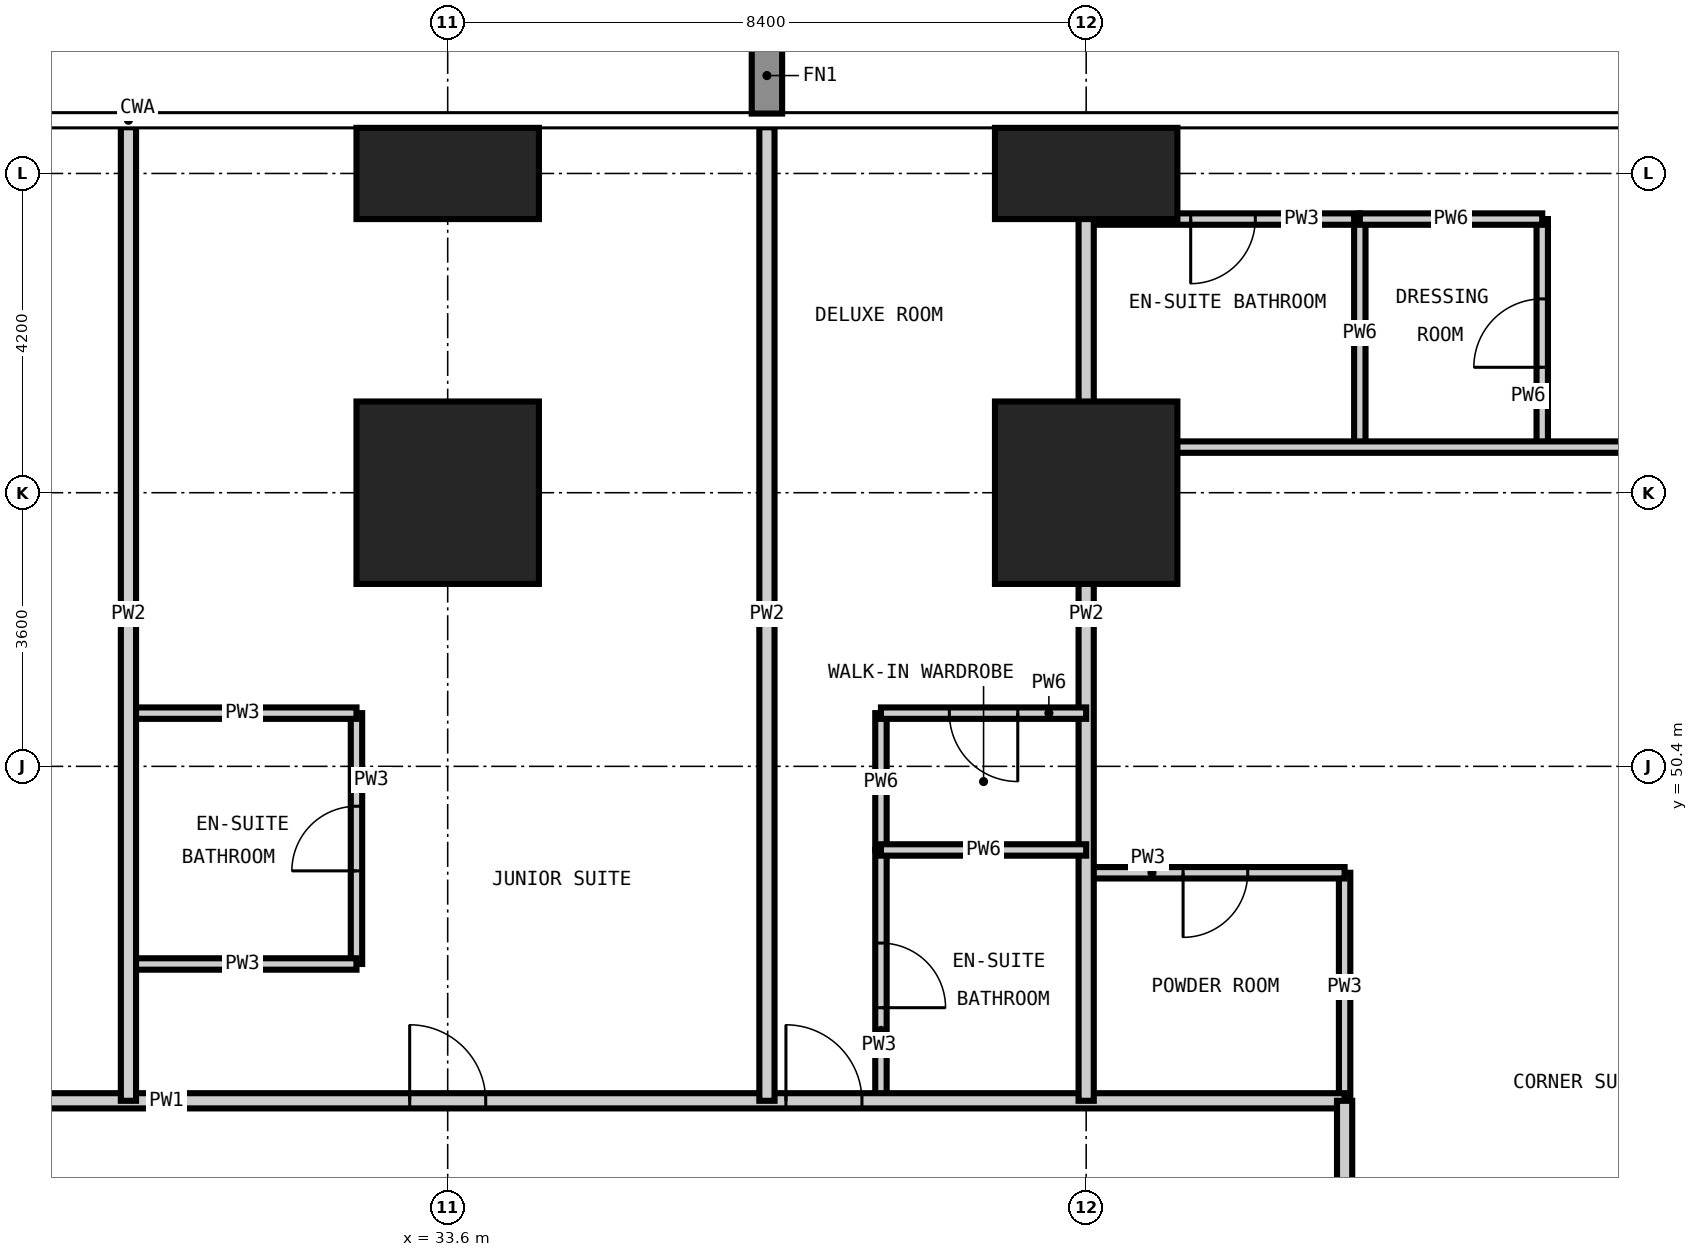
"""IFC4 building model, lengths in metres.
Left out: names, types, materials, properties, quantities, classifications, styles, units other than length and angle.
Written with IfcOpenShell. Run it as: python <this file> out.ifc"""

import sys

from ifc_helpers import new_model, si_unit, direction, frame, frame_2d, origin, origin_2d, place, context, subcontext, project, spatial, rectangle, extrude, element, fill, save


model = new_model("IFC4")
c1 = context("Model", 3, precision=1e-05, world=origin(), true_north=direction((0.0, 1.0)))
c2 = subcontext(c1, "Body", "Model", "MODEL_VIEW")
j1 = project(units=[si_unit("LENGTHUNIT", "METRE"), si_unit("PLANEANGLEUNIT", "RADIAN")], contexts=[c1])
p1 = place(None, origin())
s1 = spatial("IfcSite", under=j1, at=p1, CompositionType="ELEMENT")
p2 = place(p1, origin())
s2 = spatial("IfcBuilding", under=s1, at=p2, CompositionType="ELEMENT")
p3 = place(p2, frame((0.0, 0.0, 81.0)))
s3 = spatial("IfcBuildingStorey", under=s2, at=p3, CompositionType="ELEMENT", Elevation=81.0)
p4 = place(p3, frame((33.6, 54.0, -0.35), z_axis=(0.0, 0.0, 1.0), x_axis=(1.0, 0.0, 0.0)))
e1 = element("IfcColumn", 1, at=p4, inside=s3, PredefinedType="COLUMN", context=c2, shape_type="SweptSolid", body=[
    extrude(rectangle(XDim=2.4, YDim=2.4, at=origin_2d()), origin(), (0.0, 0.0, 1.0), 3.6),
])
p5 = place(p3, frame((33.6, 58.2, -0.35), z_axis=(0.0, 0.0, 1.0), x_axis=(1.0, 0.0, 0.0)))
e2 = element("IfcColumn", 2, at=p5, inside=s3, PredefinedType="COLUMN", context=c2, shape_type="SweptSolid", body=[
    extrude(rectangle(XDim=2.4, YDim=1.2, at=origin_2d()), origin(), (0.0, 0.0, 1.0), 3.6),
])
p6 = place(p3, frame((42.0, 54.0, -0.35), z_axis=(0.0, 0.0, 1.0), x_axis=(1.0, 0.0, 0.0)))
e3 = element("IfcColumn", 3, at=p6, inside=s3, PredefinedType="COLUMN", context=c2, shape_type="SweptSolid", body=[
    extrude(rectangle(XDim=2.4, YDim=2.4, at=origin_2d()), origin(), (0.0, 0.0, 1.0), 3.6),
])
p7 = place(p3, frame((42.0, 58.2, -0.35), z_axis=(0.0, 0.0, 1.0), x_axis=(1.0, 0.0, 0.0)))
e4 = element("IfcColumn", 4, at=p7, inside=s3, PredefinedType="COLUMN", context=c2, shape_type="SweptSolid", body=[
    extrude(rectangle(XDim=2.4, YDim=1.2, at=origin_2d()), origin(), (0.0, 0.0, 1.0), 3.6),
])
p8 = place(p3, frame((32.4, 47.8, 0.0), z_axis=(0.0, 0.0, 1.0), x_axis=(0.0, 1.0, 0.0)))
e5 = element("IfcWall", 5, at=p8, inside=s3, PredefinedType="PARTITIONING", context=c2, shape_type="SweptSolid", body=[
    extrude(rectangle(XDim=3.3, YDim=0.15, at=frame_2d((1.65, 0.0))), origin(), (0.0, 0.0, 1.0), 3.25),
])
p9 = place(p8, frame((1.225, 0.0, 0.0)))
e6 = element("IfcOpeningElement", 6, at=p9, cuts=e5, PredefinedType="OPENING", context=c2, shape_type="SweptSolid", body=[
    extrude(rectangle(XDim=0.85, YDim=2.1, at=frame_2d((0.425, 1.05))), frame((0.0, 0.085, 0.0), z_axis=(0.0, -1.0, 0.0), x_axis=(1.0, 0.0, 0.0)), (0.0, 0.0, 1.0), 0.17),
])
p10 = place(p3, frame((39.3, 46.0, 0.0), z_axis=(0.0, 0.0, 1.0), x_axis=(0.0, 1.0, 0.0)))
e7 = element("IfcWall", 7, at=p10, inside=s3, PredefinedType="PARTITIONING", context=c2, shape_type="SweptSolid", body=[
    extrude(rectangle(XDim=3.3, YDim=0.15, at=frame_2d((1.65, 0.0))), origin(), (0.0, 0.0, 1.0), 3.25),
])
p11 = place(p10, frame((1.225, 0.0, 0.0)))
e8 = element("IfcOpeningElement", 8, at=p11, cuts=e7, PredefinedType="OPENING", context=c2, shape_type="SweptSolid", body=[
    extrude(rectangle(XDim=0.85, YDim=2.1, at=frame_2d((0.425, 1.05))), frame((0.0, 0.085, 0.0), z_axis=(0.0, -1.0, 0.0), x_axis=(1.0, 0.0, 0.0)), (0.0, 0.0, 1.0), 0.17),
])
for number, where, z_axis, x_axis in (
    (9, (45.4, 46.0, 0.0), (0.0, 0.0, 1.0), (0.0, 1.0, 0.0)),
    (10, (29.4, 47.8, 0.0), (0.0, 0.0, 1.0), (1.0, 0.0, 0.0)),
):
    element("IfcWall", number, at=place(p3, frame(where, z_axis=z_axis, x_axis=x_axis)), inside=s3, PredefinedType="PARTITIONING", context=c2, shape_type="SweptSolid", body=[
        extrude(rectangle(XDim=3.0, YDim=0.15, at=frame_2d((1.5, 0.0))), origin(), (0.0, 0.0, 1.0), 3.25),
    ])
p12 = place(p3, frame((42.0, 49.0, 0.0), z_axis=(0.0, 0.0, 1.0), x_axis=(1.0, 0.0, 0.0)))
e11 = element("IfcWall", 11, at=p12, inside=s3, PredefinedType="PARTITIONING", context=c2, shape_type="SweptSolid", body=[
    extrude(rectangle(XDim=3.4, YDim=0.15, at=frame_2d((1.7, 0.0))), origin(), (0.0, 0.0, 1.0), 3.25),
])
p13 = place(p12, frame((1.275, 0.0, 0.0)))
e12 = element("IfcOpeningElement", 12, at=p13, cuts=e11, PredefinedType="OPENING", context=c2, shape_type="SweptSolid", body=[
    extrude(rectangle(XDim=0.85, YDim=2.1, at=frame_2d((0.425, 1.05))), frame((0.0, 0.085, 0.0), z_axis=(0.0, -1.0, 0.0), x_axis=(1.0, 0.0, 0.0)), (0.0, 0.0, 1.0), 0.17),
])
p14 = place(p3, frame((29.4, 51.1, 0.0), z_axis=(0.0, 0.0, 1.0), x_axis=(1.0, 0.0, 0.0)))
e13 = element("IfcWall", 13, at=p14, inside=s3, PredefinedType="PARTITIONING", context=c2, shape_type="SweptSolid", body=[
    extrude(rectangle(XDim=3.0, YDim=0.15, at=frame_2d((1.5, 0.0))), origin(), (0.0, 0.0, 1.0), 3.25),
])
p15 = place(p3, frame((42.0, 57.6, 0.0), z_axis=(0.0, 0.0, 1.0), x_axis=(1.0, 0.0, 0.0)))
e14 = element("IfcWall", 14, at=p15, inside=s3, PredefinedType="PARTITIONING", context=c2, shape_type="SweptSolid", body=[
    extrude(rectangle(XDim=3.6, YDim=0.15, at=frame_2d((1.8, 0.0))), origin(), (0.0, 0.0, 1.0), 3.25),
])
p16 = place(p15, frame((1.375, 0.0, 0.0)))
e15 = element("IfcOpeningElement", 15, at=p16, cuts=e14, PredefinedType="OPENING", context=c2, shape_type="SweptSolid", body=[
    extrude(rectangle(XDim=0.85, YDim=2.1, at=frame_2d((0.425, 1.05))), frame((0.0, 0.085, 0.0), z_axis=(0.0, -1.0, 0.0), x_axis=(1.0, 0.0, 0.0)), (0.0, 0.0, 1.0), 0.17),
])
p17 = place(p3, frame((14.0, 46.0, 0.0), z_axis=(0.0, 0.0, 1.0), x_axis=(1.0, 0.0, 0.0)))
e16 = element("IfcWall", 16, at=p17, inside=s3, PredefinedType="PARTITIONING", context=c2, shape_type="SweptSolid", body=[
    extrude(rectangle(XDim=31.4, YDim=0.2, at=frame_2d((15.7, 0.0))), origin(), (0.0, 0.0, 1.0), 3.25),
])
p18 = place(p17, frame((5.75, 0.0, 0.0)))
e17 = element("IfcOpeningElement", 17, at=p18, cuts=e16, PredefinedType="OPENING", context=c2, shape_type="SweptSolid", body=[
    extrude(rectangle(XDim=1.0, YDim=2.2, at=frame_2d((0.5, 1.1))), frame((0.0, 0.11, 0.0), z_axis=(0.0, -1.0, 0.0), x_axis=(1.0, 0.0, 0.0)), (0.0, 0.0, 1.0), 0.22),
])
p19 = place(p17, frame((10.7, 0.0, 0.0)))
e18 = element("IfcOpeningElement", 18, at=p19, cuts=e16, PredefinedType="OPENING", context=c2, shape_type="SweptSolid", body=[
    extrude(rectangle(XDim=1.0, YDim=2.2, at=frame_2d((0.5, 1.1))), frame((0.0, 0.11, 0.0), z_axis=(0.0, -1.0, 0.0), x_axis=(1.0, 0.0, 0.0)), (0.0, 0.0, 1.0), 0.22),
])
p20 = place(p17, frame((19.1, 0.0, 0.0)))
e19 = element("IfcOpeningElement", 19, at=p20, cuts=e16, PredefinedType="OPENING", context=c2, shape_type="SweptSolid", body=[
    extrude(rectangle(XDim=1.0, YDim=2.2, at=frame_2d((0.5, 1.1))), frame((0.0, 0.11, 0.0), z_axis=(0.0, -1.0, 0.0), x_axis=(1.0, 0.0, 0.0)), (0.0, 0.0, 1.0), 0.22),
])
p21 = place(p17, frame((24.05, 0.0, 0.0)))
e20 = element("IfcOpeningElement", 20, at=p21, cuts=e16, PredefinedType="OPENING", context=c2, shape_type="SweptSolid", body=[
    extrude(rectangle(XDim=1.0, YDim=2.2, at=frame_2d((0.5, 1.1))), frame((0.0, 0.11, 0.0), z_axis=(0.0, -1.0, 0.0), x_axis=(1.0, 0.0, 0.0)), (0.0, 0.0, 1.0), 0.22),
])
p22 = place(p3, frame((45.4, 46.0, 0.0), z_axis=(0.0, 0.0, 1.0), x_axis=(0.0, -1.0, 0.0)))
e21 = element("IfcWall", 21, at=p22, inside=s3, PredefinedType="PARTITIONING", context=c2, shape_type="SweptSolid", body=[
    extrude(rectangle(XDim=32.0, YDim=0.2, at=frame_2d((16.0, 0.0))), origin(), (0.0, 0.0, 1.0), 3.25),
])
p23 = place(p22, frame((22.4, 0.0, 0.0)))
e22 = element("IfcOpeningElement", 22, at=p23, cuts=e21, PredefinedType="OPENING", context=c2, shape_type="SweptSolid", body=[
    extrude(rectangle(XDim=1.0, YDim=2.2, at=frame_2d((0.5, 1.1))), frame((0.0, 0.11, 0.0), z_axis=(0.0, -1.0, 0.0), x_axis=(1.0, 0.0, 0.0)), (0.0, 0.0, 1.0), 0.22),
])
p24 = place(p22, frame((9.8, 0.0, 0.0)))
e23 = element("IfcOpeningElement", 23, at=p24, cuts=e21, PredefinedType="OPENING", context=c2, shape_type="SweptSolid", body=[
    extrude(rectangle(XDim=1.0, YDim=2.2, at=frame_2d((0.5, 1.1))), frame((0.0, 0.11, 0.0), z_axis=(0.0, -1.0, 0.0), x_axis=(1.0, 0.0, 0.0)), (0.0, 0.0, 1.0), 0.22),
])
p25 = place(p22, frame((30.1, 0.0, 0.0)))
e24 = element("IfcOpeningElement", 24, at=p25, cuts=e21, PredefinedType="OPENING", context=c2, shape_type="SweptSolid", body=[
    extrude(rectangle(XDim=1.0, YDim=2.2, at=frame_2d((0.5, 1.1))), frame((0.0, 0.11, 0.0), z_axis=(0.0, -1.0, 0.0), x_axis=(1.0, 0.0, 0.0)), (0.0, 0.0, 1.0), 0.22),
])
p26 = place(p22, frame((1.5, 0.0, 0.0)))
e25 = element("IfcOpeningElement", 25, at=p26, cuts=e21, PredefinedType="OPENING", context=c2, shape_type="SweptSolid", body=[
    extrude(rectangle(XDim=1.0, YDim=2.2, at=frame_2d((0.5, 1.1))), frame((0.0, 0.11, 0.0), z_axis=(0.0, -1.0, 0.0), x_axis=(1.0, 0.0, 0.0)), (0.0, 0.0, 1.0), 0.22),
])
for number, where, z_axis, x_axis in (
    (26, (29.4, 46.0, 0.0), (0.0, 0.0, 1.0), (0.0, 1.0, 0.0)),
    (27, (37.8, 46.0, 0.0), (0.0, 0.0, 1.0), (0.0, 1.0, 0.0)),
    (28, (42.0, 46.0, 0.0), (0.0, 0.0, 1.0), (0.0, 1.0, 0.0)),
):
    element("IfcWall", number, at=place(p3, frame(where, z_axis=z_axis, x_axis=x_axis)), inside=s3, PredefinedType="PARTITIONING", context=c2, shape_type="SweptSolid", body=[
        extrude(rectangle(XDim=12.808, YDim=0.2, at=frame_2d((6.404, 0.0))), origin(), (0.0, 0.0, 1.0), 3.25),
    ])
p27 = place(p3, frame((39.3, 49.3, 0.0), z_axis=(0.0, 0.0, 1.0), x_axis=(0.0, 1.0, 0.0)))
e29 = element("IfcWall", 29, at=p27, inside=s3, PredefinedType="PARTITIONING", context=c2, shape_type="SweptSolid", body=[
    extrude(rectangle(XDim=1.8, YDim=0.15, at=frame_2d((0.9, 0.0))), origin(), (0.0, 0.0, 1.0), 3.25),
])
p28 = place(p3, frame((45.6, 54.6, 0.0), z_axis=(0.0, 0.0, 1.0), x_axis=(0.0, 1.0, 0.0)))
e30 = element("IfcWall", 30, at=p28, inside=s3, PredefinedType="PARTITIONING", context=c2, shape_type="SweptSolid", body=[
    extrude(rectangle(XDim=3.0, YDim=0.15, at=frame_2d((1.5, 0.0))), origin(), (0.0, 0.0, 1.0), 3.25),
])
p29 = place(p3, frame((48.0, 54.6, 0.0), z_axis=(0.0, 0.0, 1.0), x_axis=(0.0, 1.0, 0.0)))
e31 = element("IfcWall", 31, at=p29, inside=s3, PredefinedType="PARTITIONING", context=c2, shape_type="SweptSolid", body=[
    extrude(rectangle(XDim=3.0, YDim=0.15, at=frame_2d((1.5, 0.0))), origin(), (0.0, 0.0, 1.0), 3.25),
])
p30 = place(p29, frame((1.05, 0.0, 0.0)))
e32 = element("IfcOpeningElement", 32, at=p30, cuts=e31, PredefinedType="OPENING", context=c2, shape_type="SweptSolid", body=[
    extrude(rectangle(XDim=0.9, YDim=2.1, at=frame_2d((0.45, 1.05))), frame((0.0, 0.085, 0.0), z_axis=(0.0, -1.0, 0.0), x_axis=(1.0, 0.0, 0.0)), (0.0, 0.0, 1.0), 0.17),
])
p31 = place(p3, frame((39.3, 49.3, 0.0), z_axis=(0.0, 0.0, 1.0), x_axis=(1.0, 0.0, 0.0)))
e33 = element("IfcWall", 33, at=p31, inside=s3, PredefinedType="PARTITIONING", context=c2, shape_type="SweptSolid", body=[
    extrude(rectangle(XDim=2.7, YDim=0.15, at=frame_2d((1.35, 0.0))), origin(), (0.0, 0.0, 1.0), 3.25),
])
p32 = place(p3, frame((39.3, 51.1, 0.0), z_axis=(0.0, 0.0, 1.0), x_axis=(1.0, 0.0, 0.0)))
e34 = element("IfcWall", 34, at=p32, inside=s3, PredefinedType="PARTITIONING", context=c2, shape_type="SweptSolid", body=[
    extrude(rectangle(XDim=2.7, YDim=0.15, at=frame_2d((1.35, 0.0))), origin(), (0.0, 0.0, 1.0), 3.25),
])
p33 = place(p32, frame((0.9, 0.0, 0.0)))
e35 = element("IfcOpeningElement", 35, at=p33, cuts=e34, PredefinedType="OPENING", context=c2, shape_type="SweptSolid", body=[
    extrude(rectangle(XDim=0.9, YDim=2.1, at=frame_2d((0.45, 1.05))), frame((0.0, 0.085, 0.0), z_axis=(0.0, -1.0, 0.0), x_axis=(1.0, 0.0, 0.0)), (0.0, 0.0, 1.0), 0.17),
])
p34 = place(p3, frame((42.0, 54.6, 0.0), z_axis=(0.0, 0.0, 1.0), x_axis=(1.0, 0.0, 0.0)))
e36 = element("IfcWall", 36, at=p34, inside=s3, PredefinedType="PARTITIONING", context=c2, shape_type="SweptSolid", body=[
    extrude(rectangle(XDim=16.808, YDim=0.15, at=frame_2d((8.404, 0.0))), origin(), (0.0, 0.0, 1.0), 3.25),
])
p35 = place(p34, frame((10.95, 0.0, 0.0)))
e37 = element("IfcOpeningElement", 37, at=p35, cuts=e36, PredefinedType="OPENING", context=c2, shape_type="SweptSolid", body=[
    extrude(rectangle(XDim=0.9, YDim=2.1, at=frame_2d((0.45, 1.05))), frame((0.0, 0.085, 0.0), z_axis=(0.0, -1.0, 0.0), x_axis=(1.0, 0.0, 0.0)), (0.0, 0.0, 1.0), 0.17),
])
p36 = place(p3, frame((45.6, 57.6, 0.0), z_axis=(0.0, 0.0, 1.0), x_axis=(1.0, 0.0, 0.0)))
e38 = element("IfcWall", 38, at=p36, inside=s3, PredefinedType="PARTITIONING", context=c2, shape_type="SweptSolid", body=[
    extrude(rectangle(XDim=2.4, YDim=0.15, at=frame_2d((1.2, 0.0))), origin(), (0.0, 0.0, 1.0), 3.25),
])
p37 = place(p20, origin())
e39 = element("IfcDoor", 39, at=p37, inside=s3, OperationType="SINGLE_SWING_LEFT", PredefinedType="DOOR", context=c2, shape_type="SweptSolid", body=[
    extrude(rectangle(XDim=1.0, YDim=2.2, at=frame_2d((0.5, 1.1))), frame((0.0, 0.025, 0.0), z_axis=(0.0, -1.0, 0.0), x_axis=(1.0, 0.0, 0.0)), (0.0, 0.0, 1.0), 0.05),
])
fill(e19, e39)
p38 = place(p9, origin())
e40 = element("IfcDoor", 40, at=p38, inside=s3, OperationType="SINGLE_SWING_LEFT", PredefinedType="DOOR", context=c2, shape_type="SweptSolid", body=[
    extrude(rectangle(XDim=0.85, YDim=2.1, at=frame_2d((0.425, 1.05))), frame((0.0, 0.025, 0.0), z_axis=(0.0, -1.0, 0.0), x_axis=(1.0, 0.0, 0.0)), (0.0, 0.0, 1.0), 0.05),
])
fill(e6, e40)
p39 = place(p21, origin())
e41 = element("IfcDoor", 41, at=p39, inside=s3, OperationType="SINGLE_SWING_LEFT", PredefinedType="DOOR", context=c2, shape_type="SweptSolid", body=[
    extrude(rectangle(XDim=1.0, YDim=2.2, at=frame_2d((0.5, 1.1))), frame((0.0, 0.025, 0.0), z_axis=(0.0, -1.0, 0.0), x_axis=(1.0, 0.0, 0.0)), (0.0, 0.0, 1.0), 0.05),
])
fill(e20, e41)
p40 = place(p11, frame((0.85, 0.0, 0.0), z_axis=(0.0, 0.0, 1.0), x_axis=(-1.0, 0.0, 0.0)))
e42 = element("IfcDoor", 42, at=p40, inside=s3, OperationType="SINGLE_SWING_RIGHT", PredefinedType="DOOR", context=c2, shape_type="SweptSolid", body=[
    extrude(rectangle(XDim=0.85, YDim=2.1, at=frame_2d((0.425, 1.05))), frame((0.0, 0.025, 0.0), z_axis=(0.0, -1.0, 0.0), x_axis=(1.0, 0.0, 0.0)), (0.0, 0.0, 1.0), 0.05),
])
fill(e8, e42)
p41 = place(p33, frame((0.9, 0.0, 0.0), z_axis=(0.0, 0.0, 1.0), x_axis=(-1.0, 0.0, 0.0)))
e43 = element("IfcDoor", 43, at=p41, inside=s3, OperationType="SINGLE_SWING_LEFT", PredefinedType="DOOR", context=c2, shape_type="SweptSolid", body=[
    extrude(rectangle(XDim=0.9, YDim=2.1, at=frame_2d((0.45, 1.05))), frame((0.0, 0.025, 0.0), z_axis=(0.0, -1.0, 0.0), x_axis=(1.0, 0.0, 0.0)), (0.0, 0.0, 1.0), 0.05),
])
fill(e35, e43)
p42 = place(p13, frame((0.85, 0.0, 0.0), z_axis=(0.0, 0.0, 1.0), x_axis=(-1.0, 0.0, 0.0)))
e44 = element("IfcDoor", 44, at=p42, inside=s3, OperationType="SINGLE_SWING_RIGHT", PredefinedType="DOOR", context=c2, shape_type="SweptSolid", body=[
    extrude(rectangle(XDim=0.85, YDim=2.1, at=frame_2d((0.425, 1.05))), frame((0.0, 0.025, 0.0), z_axis=(0.0, -1.0, 0.0), x_axis=(1.0, 0.0, 0.0)), (0.0, 0.0, 1.0), 0.05),
])
fill(e12, e44)
p43 = place(p16, frame((0.85, 0.0, 0.0), z_axis=(0.0, 0.0, 1.0), x_axis=(-1.0, 0.0, 0.0)))
e45 = element("IfcDoor", 45, at=p43, inside=s3, OperationType="SINGLE_SWING_RIGHT", PredefinedType="DOOR", context=c2, shape_type="SweptSolid", body=[
    extrude(rectangle(XDim=0.85, YDim=2.1, at=frame_2d((0.425, 1.05))), frame((0.0, 0.025, 0.0), z_axis=(0.0, -1.0, 0.0), x_axis=(1.0, 0.0, 0.0)), (0.0, 0.0, 1.0), 0.05),
])
fill(e15, e45)
p44 = place(p30, origin())
e46 = element("IfcDoor", 46, at=p44, inside=s3, OperationType="SINGLE_SWING_LEFT", PredefinedType="DOOR", context=c2, shape_type="SweptSolid", body=[
    extrude(rectangle(XDim=0.9, YDim=2.1, at=frame_2d((0.45, 1.05))), frame((0.0, 0.025, 0.0), z_axis=(0.0, -1.0, 0.0), x_axis=(1.0, 0.0, 0.0)), (0.0, 0.0, 1.0), 0.05),
])
fill(e32, e46)
save(model, sys.argv[1])
